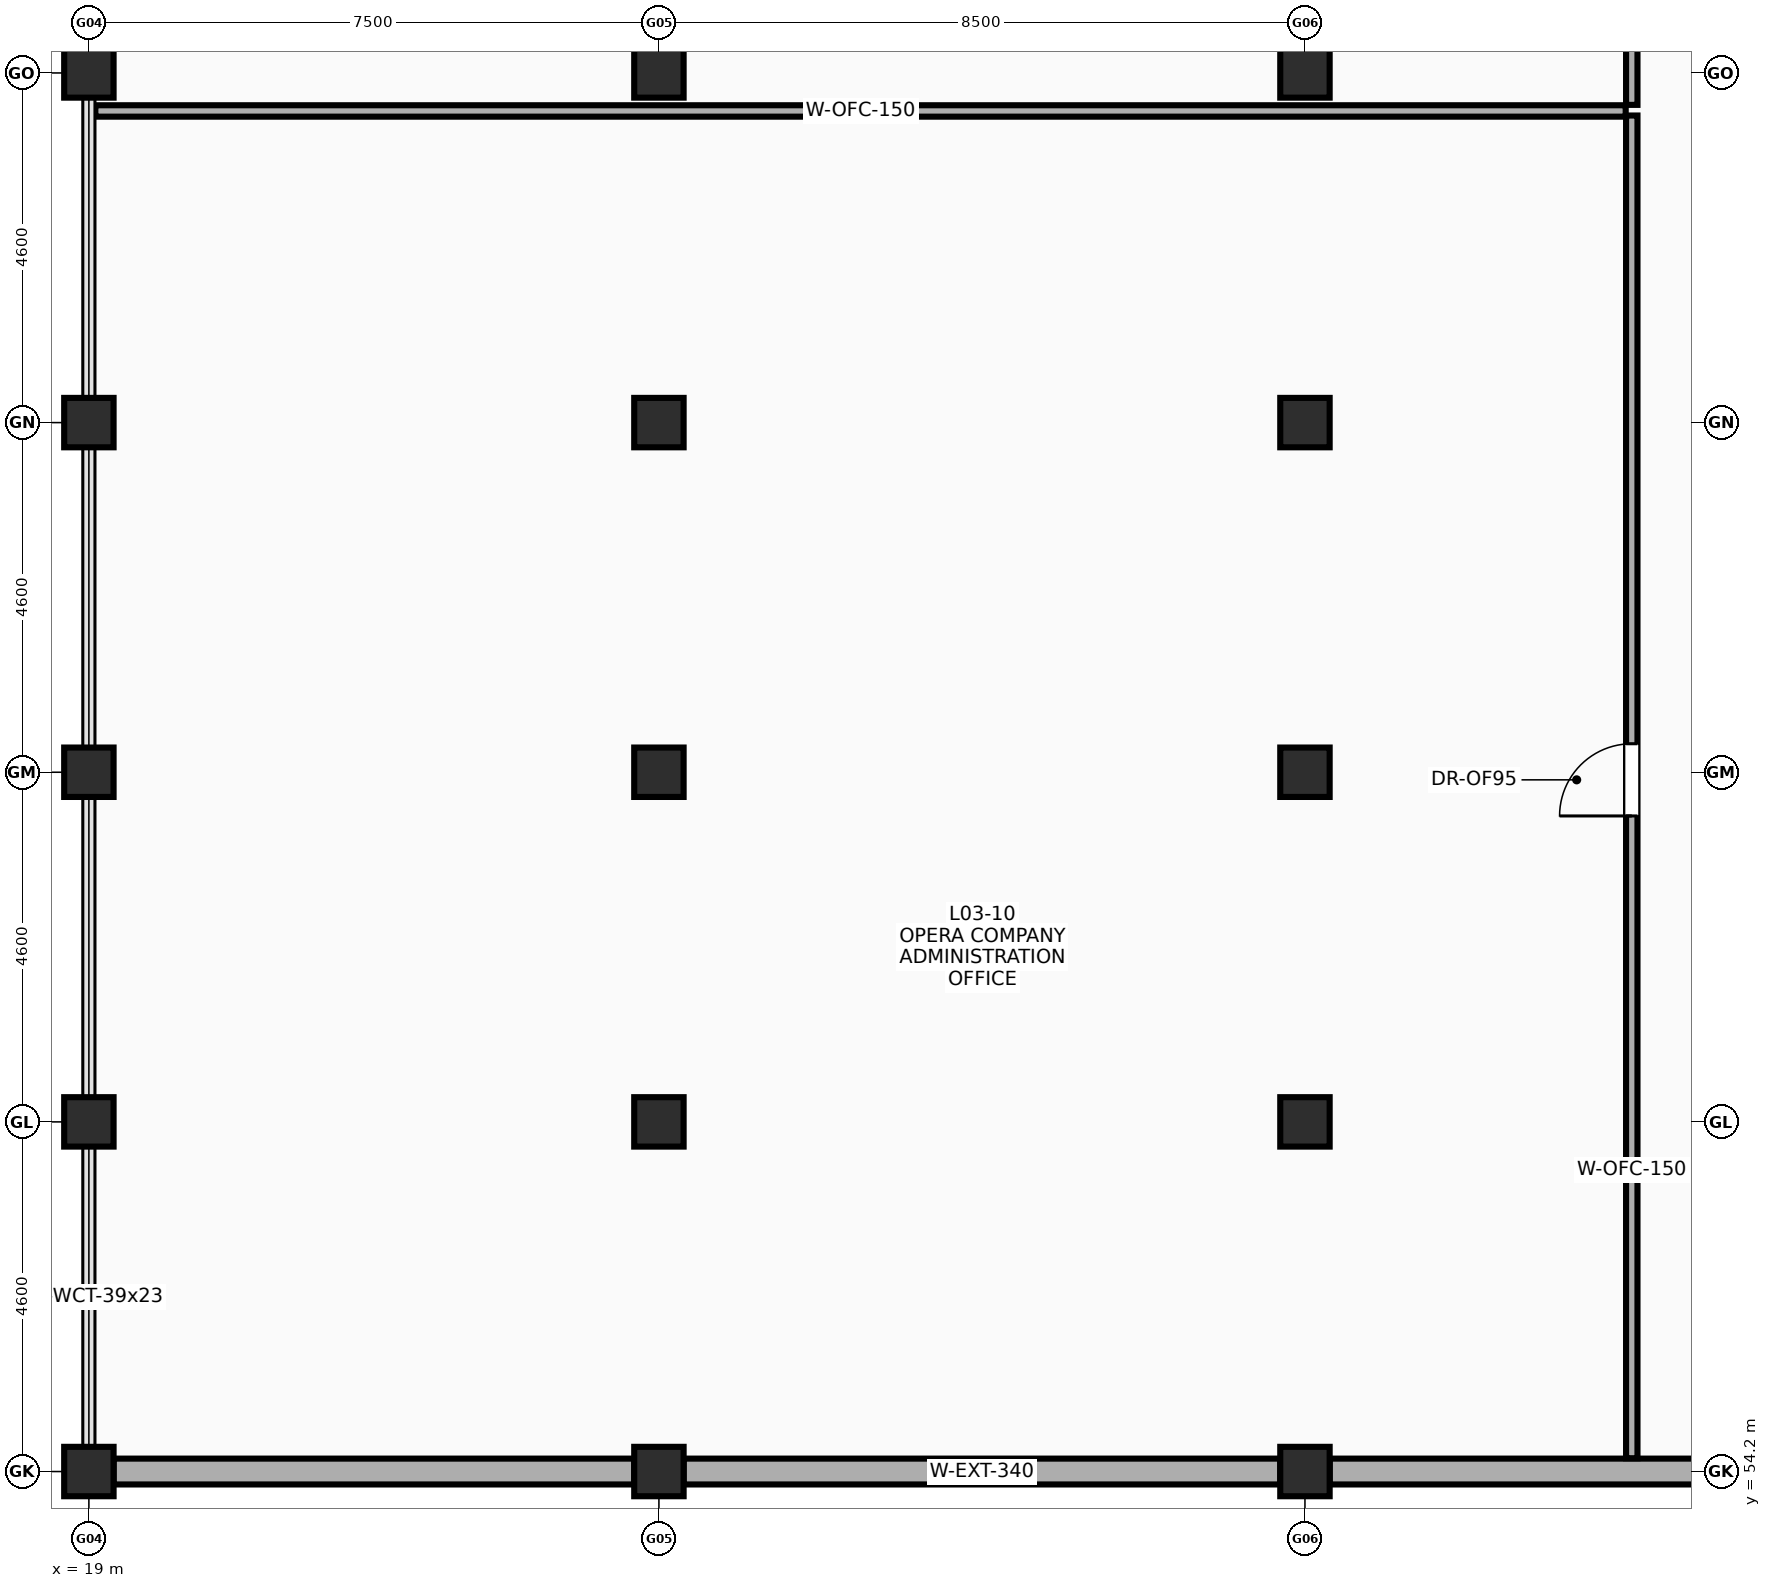
"""IFC4 building model, lengths in metres.
Left out: names, types, materials, properties, quantities, classifications, styles, units other than length and angle.
Written with IfcOpenShell. Run it as: python <this file> out.ifc"""

import sys

from ifc_helpers import new_model, si_unit, direction, frame, frame_2d, origin, origin_2d, place, context, subcontext, project, spatial, rectangle, extrude, element, fill, save


model = new_model("IFC4")
c1 = context("Model", 3, precision=1e-05, world=origin(), true_north=direction((0.0, 1.0)))
c2 = subcontext(c1, "Body", "Model", "MODEL_VIEW")
j1 = project(units=[si_unit("LENGTHUNIT", "METRE"), si_unit("PLANEANGLEUNIT", "RADIAN")], contexts=[c1])
p1 = place(None, origin())
s1 = spatial("IfcSite", under=j1, at=p1, CompositionType="ELEMENT")
p2 = place(p1, origin())
s2 = spatial("IfcBuilding", under=s1, at=p2, CompositionType="ELEMENT")
p3 = place(p2, frame((0.0, 0.0, 14.2)))
s3 = spatial("IfcBuildingStorey", under=s2, at=p3, CompositionType="ELEMENT", Elevation=14.2)
for number, where, z_axis, x_axis in (
    (1, (19.0, 54.2, 0.0), (0.0, 0.0, 1.0), (1.0, 0.0, 0.0)),
    (2, (19.0, 58.8, 0.0), (0.0, 0.0, 1.0), (1.0, 0.0, 0.0)),
    (3, (19.0, 63.4, 0.0), (0.0, 0.0, 1.0), (1.0, 0.0, 0.0)),
    (4, (19.0, 68.0, 0.0), (0.0, 0.0, 1.0), (1.0, 0.0, 0.0)),
    (5, (19.0, 72.6, 0.0), (0.0, 0.0, 1.0), (1.0, 0.0, 0.0)),
    (6, (26.5, 54.2, 0.0), (0.0, 0.0, 1.0), (1.0, 0.0, 0.0)),
    (7, (26.5, 58.8, 0.0), (0.0, 0.0, 1.0), (1.0, 0.0, 0.0)),
    (8, (26.5, 63.4, 0.0), (0.0, 0.0, 1.0), (1.0, 0.0, 0.0)),
    (9, (26.5, 68.0, 0.0), (0.0, 0.0, 1.0), (1.0, 0.0, 0.0)),
    (10, (26.5, 72.6, 0.0), (0.0, 0.0, 1.0), (1.0, 0.0, 0.0)),
    (11, (35.0, 54.2, 0.0), (0.0, 0.0, 1.0), (1.0, 0.0, 0.0)),
    (12, (35.0, 58.8, 0.0), (0.0, 0.0, 1.0), (1.0, 0.0, 0.0)),
    (13, (35.0, 63.4, 0.0), (0.0, 0.0, 1.0), (1.0, 0.0, 0.0)),
    (14, (35.0, 68.0, 0.0), (0.0, 0.0, 1.0), (1.0, 0.0, 0.0)),
    (15, (35.0, 72.6, 0.0), (0.0, 0.0, 1.0), (1.0, 0.0, 0.0)),
):
    element("IfcColumn", number, at=place(p3, frame(where, z_axis=z_axis, x_axis=x_axis)), inside=s3, PredefinedType="COLUMN", context=c2, shape_type="SweptSolid", body=[
        extrude(rectangle(XDim=0.65, YDim=0.65, at=origin_2d()), origin(), (0.0, 0.0, 1.0), 3.8),
    ])
p4 = place(p3, frame((19.325, 54.2, 0.0), z_axis=(0.0, 0.0, 1.0), x_axis=(1.0, 0.0, 0.0)))
e16 = element("IfcWall", 16, at=p4, inside=s3, PredefinedType="SOLIDWALL", context=c2, shape_type="SweptSolid", body=[
    extrude(rectangle(XDim=6.85, YDim=0.34, at=frame_2d((3.425, 0.0))), origin(), (0.0, 0.0, 1.0), 2.35),
])
p5 = place(p3, frame((26.825, 54.2, 0.0), z_axis=(0.0, 0.0, 1.0), x_axis=(1.0, 0.0, 0.0)))
e17 = element("IfcWall", 17, at=p5, inside=s3, PredefinedType="SOLIDWALL", context=c2, shape_type="SweptSolid", body=[
    extrude(rectangle(XDim=7.85, YDim=0.34, at=frame_2d((3.925, 0.0))), origin(), (0.0, 0.0, 1.0), 2.35),
])
p6 = place(p3, frame((35.325, 54.2, 0.0), z_axis=(0.0, 0.0, 1.0), x_axis=(1.0, 0.0, 0.0)))
e18 = element("IfcWall", 18, at=p6, inside=s3, PredefinedType="SOLIDWALL", context=c2, shape_type="SweptSolid", body=[
    extrude(rectangle(XDim=7.175, YDim=0.34, at=frame_2d((3.587, 0.0))), origin(), (0.0, 0.0, 1.0), 2.35),
])
p7 = place(p3, frame((19.085, 72.1, 0.0), z_axis=(0.0, 0.0, 1.0), x_axis=(1.0, 0.0, 0.0)))
e19 = element("IfcWall", 19, at=p7, inside=s3, PredefinedType="PARTITIONING", context=c2, shape_type="SweptSolid", body=[
    extrude(rectangle(XDim=20.135, YDim=0.15, at=frame_2d((10.067, 0.0))), origin(), (0.0, 0.0, 1.0), 2.9),
])
p8 = place(p3, frame((39.3, 54.375, 0.0), z_axis=(0.0, 0.0, 1.0), x_axis=(0.0, 1.0, 0.0)))
e20 = element("IfcWall", 20, at=p8, inside=s3, PredefinedType="PARTITIONING", context=c2, shape_type="SweptSolid", body=[
    extrude(rectangle(XDim=17.665, YDim=0.15, at=frame_2d((8.833, 0.0))), origin(), (0.0, 0.0, 1.0), 2.7),
])
p9 = place(p8, frame((8.45, 0.0, 0.0)))
e21 = element("IfcOpeningElement", 21, at=p9, cuts=e20, PredefinedType="OPENING", context=c2, shape_type="SweptSolid", body=[
    extrude(rectangle(XDim=0.95, YDim=2.15, at=frame_2d((0.475, 1.075))), frame((0.0, 0.085, 0.0), z_axis=(0.0, -1.0, 0.0), x_axis=(1.0, 0.0, 0.0)), (0.0, 0.0, 1.0), 0.17),
])
p10 = place(p3, frame((39.3, 72.18, 0.0), z_axis=(0.0, 0.0, 1.0), x_axis=(0.0, 1.0, 0.0)))
e22 = element("IfcWall", 22, at=p10, inside=s3, PredefinedType="PARTITIONING", context=c2, shape_type="SweptSolid", body=[
    extrude(rectangle(XDim=13.16, YDim=0.15, at=frame_2d((6.58, 0.0))), origin(), (0.0, 0.0, 1.0), 2.7),
])
p11 = place(p10, frame((6.145, 0.0, 0.0)))
e23 = element("IfcOpeningElement", 23, at=p11, cuts=e22, PredefinedType="OPENING", context=c2, shape_type="SweptSolid", body=[
    extrude(rectangle(XDim=0.95, YDim=2.15, at=frame_2d((0.475, 1.075))), frame((0.0, 0.085, 0.0), z_axis=(0.0, -1.0, 0.0), x_axis=(1.0, 0.0, 0.0)), (0.0, 0.0, 1.0), 0.17),
])
p12 = place(p9, origin())
e24 = element("IfcDoor", 24, at=p12, inside=s3, OperationType="SINGLE_SWING_LEFT", PredefinedType="DOOR", context=c2, shape_type="SweptSolid", body=[
    extrude(rectangle(XDim=0.95, YDim=2.15, at=frame_2d((0.475, 1.075))), frame((0.0, 0.025, 0.0), z_axis=(0.0, -1.0, 0.0), x_axis=(1.0, 0.0, 0.0)), (0.0, 0.0, 1.0), 0.05),
])
fill(e21, e24)
save(model, sys.argv[1])
